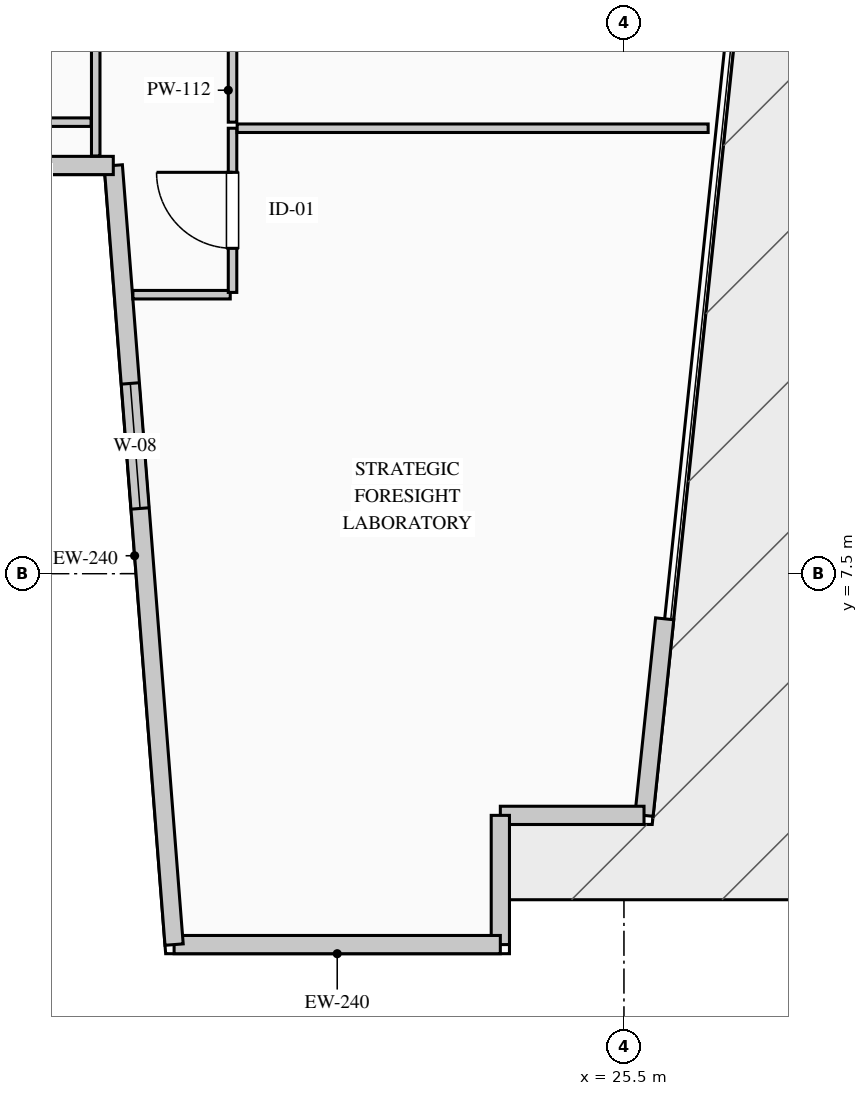
"""IFC4 building model, lengths in metres.
Left out: names, types, materials, properties, quantities, classifications, styles, units other than length and angle.
Written with IfcOpenShell. Run it as: python <this file> out.ifc"""

import sys

from ifc_helpers import new_model, si_unit, direction, frame, frame_2d, origin, place, context, subcontext, project, spatial, rectangle, extrude, element, fill, save


model = new_model("IFC4")
c1 = context("Model", 3, precision=1e-05, world=origin(), true_north=direction((0.0, 1.0)))
c2 = subcontext(c1, "Body", "Model", "MODEL_VIEW")
j1 = project(units=[si_unit("LENGTHUNIT", "METRE"), si_unit("PLANEANGLEUNIT", "RADIAN")], contexts=[c1])
p1 = place(None, origin())
s1 = spatial("IfcSite", under=j1, at=p1, CompositionType="ELEMENT")
p2 = place(p1, origin())
s2 = spatial("IfcBuilding", under=s1, at=p2, CompositionType="ELEMENT")
p3 = place(p2, frame((0.0, 0.0, 276.45)))
s3 = spatial("IfcBuildingStorey", under=s2, at=p3, CompositionType="ELEMENT", Elevation=276.45)
p4 = place(p3, frame((26.036, 6.906, 0.0), z_axis=(0.0, 0.0, 1.0), x_axis=(-0.104513699976, -0.994523446942, 0.0)))
e1 = element("IfcWall", 1, at=p4, inside=s3, PredefinedType="STANDARD", context=c2, shape_type="SweptSolid", body=[
    extrude(rectangle(XDim=2.6, YDim=0.24, at=frame_2d((1.3, 0.0))), origin(), (0.0, 0.0, 1.0), 3.7),
])
p5 = place(p3, frame((25.764, 4.32, 0.0), z_axis=(0.0, 0.0, 1.0), x_axis=(-1.0, 0.0, 0.0)))
e2 = element("IfcWall", 2, at=p5, inside=s3, PredefinedType="STANDARD", context=c2, shape_type="SweptSolid", body=[
    extrude(rectangle(XDim=1.89, YDim=0.24, at=frame_2d((0.945, 0.0))), origin(), (0.0, 0.0, 1.0), 3.7),
])
p6 = place(p3, frame((23.874, 4.32, 0.0), z_axis=(0.0, 0.0, 1.0), x_axis=(0.0, -1.0, 0.0)))
e3 = element("IfcWall", 3, at=p6, inside=s3, PredefinedType="STANDARD", context=c2, shape_type="SweptSolid", body=[
    extrude(rectangle(XDim=1.7, YDim=0.24, at=frame_2d((0.85, 0.0))), origin(), (0.0, 0.0, 1.0), 3.7),
])
p7 = place(p3, frame((23.874, 2.62, 0.0), z_axis=(0.0, 0.0, 1.0), x_axis=(-1.0, 0.0, 0.0)))
e4 = element("IfcWall", 4, at=p7, inside=s3, PredefinedType="STANDARD", context=c2, shape_type="SweptSolid", body=[
    extrude(rectangle(XDim=4.292, YDim=0.24, at=frame_2d((2.146, 0.0))), origin(), (0.0, 0.0, 1.0), 3.7),
])
p8 = place(p3, frame((19.581, 2.62, 0.0), z_axis=(0.0, 0.0, 1.0), x_axis=(-0.077816860153, 0.996967670627, 0.0)))
e5 = element("IfcWall", 5, at=p8, inside=s3, PredefinedType="STANDARD", context=c2, shape_type="SweptSolid", body=[
    extrude(rectangle(XDim=10.281, YDim=0.24, at=frame_2d((5.141, 0.0))), origin(), (0.0, 0.0, 1.0), 3.7),
])
p9 = place(p8, frame((5.755, 0.0, 0.9)))
e6 = element("IfcOpeningElement", 6, at=p9, cuts=e5, PredefinedType="OPENING", context=c2, shape_type="SweptSolid", body=[
    extrude(rectangle(XDim=1.65, YDim=1.95, at=frame_2d((0.825, 0.975))), frame((0.0, 0.13, 0.0), z_axis=(0.0, -1.0, 0.0), x_axis=(1.0, 0.0, 0.0)), (0.0, 0.0, 1.0), 0.26),
])
p10 = place(p3, frame((18.781, 12.87, 0.0), z_axis=(0.0, 0.0, 1.0), x_axis=(-1.0, 0.0, 0.0)))
e7 = element("IfcWall", 7, at=p10, inside=s3, PredefinedType="STANDARD", context=c2, shape_type="SweptSolid", body=[
    extrude(rectangle(XDim=3.641, YDim=0.24, at=frame_2d((1.82, 0.0))), origin(), (0.0, 0.0, 1.0), 3.7),
])
p11 = place(p3, frame((19.039, 11.17, 0.0), z_axis=(0.0, 0.0, 1.0), x_axis=(1.0, 0.0, 0.0)))
e8 = element("IfcWall", 8, at=p11, inside=s3, PredefinedType="PARTITIONING", context=c2, shape_type="SweptSolid", body=[
    extrude(rectangle(XDim=1.281, YDim=0.112, at=frame_2d((0.64, 0.0))), origin(), (0.0, 0.0, 1.0), 3.7),
])
p12 = place(p3, frame((20.35, 11.2, 0.0), z_axis=(0.0, 0.0, 1.0), x_axis=(0.0, 1.0, 0.0)))
e9 = element("IfcWall", 9, at=p12, inside=s3, PredefinedType="PARTITIONING", context=c2, shape_type="SweptSolid", body=[
    extrude(rectangle(XDim=2.16, YDim=0.112, at=frame_2d((1.08, 0.0))), origin(), (0.0, 0.0, 1.0), 3.7),
])
p13 = place(p12, frame((0.58, 0.0, 0.0)))
e10 = element("IfcOpeningElement", 10, at=p13, cuts=e9, PredefinedType="OPENING", context=c2, shape_type="SweptSolid", body=[
    extrude(rectangle(XDim=1.0, YDim=2.15, at=frame_2d((0.5, 1.075))), frame((0.0, 0.066, 0.0), z_axis=(0.0, -1.0, 0.0), x_axis=(1.0, 0.0, 0.0)), (0.0, 0.0, 1.0), 0.132),
])
p14 = place(p3, frame((20.411, 13.36, 0.0), z_axis=(0.0, 0.0, 1.0), x_axis=(1.0, 0.0, 0.0)))
e11 = element("IfcWall", 11, at=p14, inside=s3, PredefinedType="PARTITIONING", context=c2, shape_type="SweptSolid", body=[
    extrude(rectangle(XDim=6.197, YDim=0.112, at=frame_2d((3.099, 0.0))), origin(), (0.0, 0.0, 1.0), 3.7),
])
p15 = place(p3, frame((20.35, 13.44, 0.0), z_axis=(0.0, 0.0, 1.0), x_axis=(0.0, 1.0, 0.0)))
e12 = element("IfcWall", 12, at=p15, inside=s3, PredefinedType="PARTITIONING", context=c2, shape_type="SweptSolid", body=[
    extrude(rectangle(XDim=3.58, YDim=0.112, at=frame_2d((1.79, 0.0))), origin(), (0.0, 0.0, 1.0), 3.7),
])
p16 = place(p15, frame((1.29, 0.0, 0.0)))
e13 = element("IfcOpeningElement", 13, at=p16, cuts=e12, PredefinedType="OPENING", context=c2, shape_type="SweptSolid", body=[
    extrude(rectangle(XDim=1.0, YDim=2.15, at=frame_2d((0.5, 1.075))), frame((0.0, 0.066, 0.0), z_axis=(0.0, -1.0, 0.0), x_axis=(1.0, 0.0, 0.0)), (0.0, 0.0, 1.0), 0.132),
])
p17 = place(p3, frame((18.55, 19.559, 0.0), z_axis=(0.0, 0.0, 1.0), x_axis=(0.0, -1.0, 0.0)))
e14 = element("IfcWall", 14, at=p17, inside=s3, PredefinedType="PARTITIONING", context=c2, shape_type="SweptSolid", body=[
    extrude(rectangle(XDim=6.564, YDim=0.112, at=frame_2d((3.282, 0.0))), origin(), (0.0, 0.0, 1.0), 3.7),
])
p18 = place(p3, frame((18.489, 13.44, 0.0), z_axis=(0.0, 0.0, 1.0), x_axis=(-1.0, 0.0, 0.0)))
e15 = element("IfcWall", 15, at=p18, inside=s3, PredefinedType="PARTITIONING", context=c2, shape_type="SweptSolid", body=[
    extrude(rectangle(XDim=2.474, YDim=0.112, at=frame_2d((1.237, 0.0))), origin(), (0.0, 0.0, 1.0), 3.7),
])
p19 = place(p9, origin())
e16 = element("IfcWindow", 16, at=p19, inside=s3, PartitioningType="SINGLE_PANEL", PredefinedType="WINDOW", context=c2, shape_type="SweptSolid", body=[
    extrude(rectangle(XDim=1.65, YDim=1.95, at=frame_2d((0.825, 0.975))), frame((0.0, 0.03, 0.0), z_axis=(0.0, -1.0, 0.0), x_axis=(1.0, 0.0, 0.0)), (0.0, 0.0, 1.0), 0.06),
])
fill(e6, e16)
p20 = place(p13, origin())
e17 = element("IfcDoor", 17, at=p20, inside=s3, OperationType="SINGLE_SWING_RIGHT", PredefinedType="DOOR", context=c2, shape_type="SweptSolid", body=[
    extrude(rectangle(XDim=1.0, YDim=2.15, at=frame_2d((0.5, 1.075))), frame((0.0, 0.025, 0.0), z_axis=(0.0, -1.0, 0.0), x_axis=(1.0, 0.0, 0.0)), (0.0, 0.0, 1.0), 0.05),
])
fill(e10, e17)
save(model, sys.argv[1])
